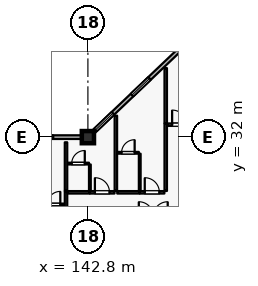
"""IFC4 building model, lengths in metres.
Left out: names, types, materials, properties, quantities, classifications, styles, units other than length and angle.
Written with IfcOpenShell. Run it as: python <this file> out.ifc"""

import sys

from ifc_helpers import new_model, si_unit, direction, frame, frame_2d, origin, origin_2d, place, context, subcontext, project, spatial, rectangle, extrude, element, fill, save


model = new_model("IFC4")
c1 = context("Model", 3, precision=1e-05, world=origin(), true_north=direction((0.0, 1.0)))
c2 = subcontext(c1, "Body", "Model", "MODEL_VIEW")
j1 = project(units=[si_unit("LENGTHUNIT", "METRE"), si_unit("PLANEANGLEUNIT", "RADIAN")], contexts=[c1])
p1 = place(None, origin())
s1 = spatial("IfcSite", under=j1, at=p1, CompositionType="ELEMENT")
p2 = place(p1, origin())
s2 = spatial("IfcBuilding", under=s1, at=p2, CompositionType="ELEMENT")
p3 = place(p2, frame((0.0, 0.0, 16.2)))
s3 = spatial("IfcBuildingStorey", under=s2, at=p3, CompositionType="ELEMENT", Elevation=16.2)
p4 = place(p3, frame((142.8, 32.0, 0.0), z_axis=(0.0, 0.0, 1.0), x_axis=(1.0, 0.0, 0.0)))
e1 = element("IfcColumn", 1, at=p4, inside=s3, PredefinedType="COLUMN", context=c2, shape_type="SweptSolid", body=[
    extrude(rectangle(XDim=0.8, YDim=0.8, at=origin_2d()), origin(), (0.0, 0.0, 1.0), 4.8),
])
p5 = place(p3, frame((134.8, 32.0, 0.0), z_axis=(0.0, 0.0, 1.0), x_axis=(1.0, 0.0, 0.0)))
e2 = element("IfcWall", 2, at=p5, inside=s3, PredefinedType="SOLIDWALL", context=c2, shape_type="SweptSolid", body=[
    extrude(rectangle(XDim=7.6, YDim=0.24, at=frame_2d((3.8, 0.0))), origin(), (0.0, 0.0, 1.0), 4.13),
])
p6 = place(p5, frame((0.84, 0.0, 0.8)))
e3 = element("IfcOpeningElement", 3, at=p6, cuts=e2, PredefinedType="OPENING", context=c2, shape_type="SweptSolid", body=[
    extrude(rectangle(XDim=1.6, YDim=1.6, at=frame_2d((0.8, 0.8))), frame((0.0, 0.13, 0.0), z_axis=(0.0, -1.0, 0.0), x_axis=(1.0, 0.0, 0.0)), (0.0, 0.0, 1.0), 0.26),
])
p7 = place(p5, frame((4.12, 0.0, 0.8)))
e4 = element("IfcOpeningElement", 4, at=p7, cuts=e2, PredefinedType="OPENING", context=c2, shape_type="SweptSolid", body=[
    extrude(rectangle(XDim=1.6, YDim=1.6, at=frame_2d((0.8, 0.8))), frame((0.0, 0.13, 0.0), z_axis=(0.0, -1.0, 0.0), x_axis=(1.0, 0.0, 0.0)), (0.0, 0.0, 1.0), 0.26),
])
p8 = place(p3, frame((143.2, 32.381, 0.0), z_axis=(0.0, 0.0, 1.0), x_axis=(0.724156739794, 0.689635422677, 0.0)))
e5 = element("IfcWall", 5, at=p8, inside=s3, PredefinedType="SOLIDWALL", context=c2, shape_type="SweptSolid", body=[
    extrude(rectangle(XDim=10.495, YDim=0.24, at=frame_2d((5.248, 0.0))), origin(), (0.0, 0.0, 1.0), 4.13),
])
p9 = place(p8, frame((0.125, 0.0, 0.8)))
e6 = element("IfcOpeningElement", 6, at=p9, cuts=e5, PredefinedType="OPENING", context=c2, shape_type="SweptSolid", body=[
    extrude(rectangle(XDim=1.6, YDim=1.6, at=frame_2d((0.8, 0.8))), frame((0.0, 0.13, 0.0), z_axis=(0.0, -1.0, 0.0), x_axis=(1.0, 0.0, 0.0)), (0.0, 0.0, 1.0), 0.26),
])
p10 = place(p8, frame((3.453, 0.0, 0.8)))
e7 = element("IfcOpeningElement", 7, at=p10, cuts=e5, PredefinedType="OPENING", context=c2, shape_type="SweptSolid", body=[
    extrude(rectangle(XDim=1.6, YDim=1.6, at=frame_2d((0.8, 0.8))), frame((0.0, 0.13, 0.0), z_axis=(0.0, -1.0, 0.0), x_axis=(1.0, 0.0, 0.0)), (0.0, 0.0, 1.0), 0.26),
])
p11 = place(p8, frame((7.776, 0.0, 0.8)))
e8 = element("IfcOpeningElement", 8, at=p11, cuts=e5, PredefinedType="OPENING", context=c2, shape_type="SweptSolid", body=[
    extrude(rectangle(XDim=1.6, YDim=1.6, at=frame_2d((0.8, 0.8))), frame((0.0, 0.13, 0.0), z_axis=(0.0, -1.0, 0.0), x_axis=(1.0, 0.0, 0.0)), (0.0, 0.0, 1.0), 0.26),
])
p12 = place(p3, frame((139.85, 27.57, 0.0), z_axis=(0.0, 0.0, 1.0), x_axis=(1.0, 0.0, 0.0)))
e9 = element("IfcWall", 9, at=p12, inside=s3, PredefinedType="PARTITIONING", context=c2, shape_type="SweptSolid", body=[
    extrude(rectangle(XDim=1.41, YDim=0.115, at=frame_2d((0.705, 0.0))), origin(), (0.0, 0.0, 1.0), 4.535),
])
p13 = place(p12, frame((0.275, 0.0, 0.0)))
e10 = element("IfcOpeningElement", 10, at=p13, cuts=e9, PredefinedType="OPENING", context=c2, shape_type="SweptSolid", body=[
    extrude(rectangle(XDim=0.86, YDim=2.12, at=frame_2d((0.43, 1.06))), frame((0.0, 0.067, 0.0), z_axis=(0.0, -1.0, 0.0), x_axis=(1.0, 0.0, 0.0)), (0.0, 0.0, 1.0), 0.135),
])
p14 = place(p3, frame((141.36, 25.06, 0.0), z_axis=(0.0, 0.0, 1.0), x_axis=(0.0, 1.0, 0.0)))
e11 = element("IfcWall", 11, at=p14, inside=s3, PredefinedType="PARTITIONING", context=c2, shape_type="SweptSolid", body=[
    extrude(rectangle(XDim=3.39, YDim=0.16, at=frame_2d((1.695, 0.0))), origin(), (0.0, 0.0, 1.0), 4.535),
])
p15 = place(p3, frame((141.45, 28.37, 0.0), z_axis=(0.0, 0.0, 1.0), x_axis=(1.0, 0.0, 0.0)))
e12 = element("IfcWall", 12, at=p15, inside=s3, PredefinedType="PARTITIONING", context=c2, shape_type="SweptSolid", body=[
    extrude(rectangle(XDim=1.47, YDim=0.16, at=frame_2d((0.735, 0.0))), origin(), (0.0, 0.0, 1.0), 4.535),
])
p16 = place(p3, frame((142.93, 28.37, 0.0), z_axis=(0.0, 0.0, 1.0), x_axis=(1.0, 0.0, 0.0)))
e13 = element("IfcWall", 13, at=p16, inside=s3, PredefinedType="PARTITIONING", context=c2, shape_type="SweptSolid", body=[
    extrude(rectangle(XDim=1.62, YDim=0.16, at=frame_2d((0.81, 0.0))), origin(), (0.0, 0.0, 1.0), 4.535),
])
p17 = place(p16, frame((0.33, 0.0, 0.0)))
e14 = element("IfcOpeningElement", 14, at=p17, cuts=e13, PredefinedType="OPENING", context=c2, shape_type="SweptSolid", body=[
    extrude(rectangle(XDim=0.96, YDim=2.2, at=frame_2d((0.48, 1.1))), frame((0.0, 0.09, 0.0), z_axis=(0.0, -1.0, 0.0), x_axis=(1.0, 0.0, 0.0)), (0.0, 0.0, 1.0), 0.18),
])
p18 = place(p3, frame((142.93, 28.46, 0.0), z_axis=(0.0, 0.0, 1.0), x_axis=(0.0, 1.0, 0.0)))
e15 = element("IfcWall", 15, at=p18, inside=s3, PredefinedType="PARTITIONING", context=c2, shape_type="SweptSolid", body=[
    extrude(rectangle(XDim=1.74, YDim=0.115, at=frame_2d((0.87, 0.0))), origin(), (0.0, 0.0, 1.0), 4.535),
])
p19 = place(p3, frame((141.46, 30.26, 0.0), z_axis=(0.0, 0.0, 1.0), x_axis=(1.0, 0.0, 0.0)))
e16 = element("IfcWall", 16, at=p19, inside=s3, PredefinedType="PARTITIONING", context=c2, shape_type="SweptSolid", body=[
    extrude(rectangle(XDim=1.41, YDim=0.115, at=frame_2d((0.705, 0.0))), origin(), (0.0, 0.0, 1.0), 4.535),
])
p20 = place(p19, frame((0.275, 0.0, 0.0)))
e17 = element("IfcOpeningElement", 17, at=p20, cuts=e16, PredefinedType="OPENING", context=c2, shape_type="SweptSolid", body=[
    extrude(rectangle(XDim=0.86, YDim=2.12, at=frame_2d((0.43, 1.06))), frame((0.0, 0.067, 0.0), z_axis=(0.0, -1.0, 0.0), x_axis=(1.0, 0.0, 0.0)), (0.0, 0.0, 1.0), 0.135),
])
p21 = place(p3, frame((141.36, 28.46, 0.0), z_axis=(0.0, 0.0, 1.0), x_axis=(0.0, 1.0, 0.0)))
e18 = element("IfcWall", 18, at=p21, inside=s3, PredefinedType="PARTITIONING", context=c2, shape_type="SweptSolid", body=[
    extrude(rectangle(XDim=3.2, YDim=0.16, at=frame_2d((1.6, 0.0))), origin(), (0.0, 0.0, 1.0), 4.535),
])
p22 = place(p3, frame((144.73, 28.37, 0.0), z_axis=(0.0, 0.0, 1.0), x_axis=(1.0, 0.0, 0.0)))
e19 = element("IfcWall", 19, at=p22, inside=s3, PredefinedType="PARTITIONING", context=c2, shape_type="SweptSolid", body=[
    extrude(rectangle(XDim=1.47, YDim=0.16, at=frame_2d((0.735, 0.0))), origin(), (0.0, 0.0, 1.0), 4.535),
])
p23 = place(p3, frame((146.21, 28.37, 0.0), z_axis=(0.0, 0.0, 1.0), x_axis=(1.0, 0.0, 0.0)))
e20 = element("IfcWall", 20, at=p23, inside=s3, PredefinedType="PARTITIONING", context=c2, shape_type="SweptSolid", body=[
    extrude(rectangle(XDim=1.62, YDim=0.16, at=frame_2d((0.81, 0.0))), origin(), (0.0, 0.0, 1.0), 4.535),
])
p24 = place(p23, frame((0.33, 0.0, 0.0)))
e21 = element("IfcOpeningElement", 21, at=p24, cuts=e20, PredefinedType="OPENING", context=c2, shape_type="SweptSolid", body=[
    extrude(rectangle(XDim=0.96, YDim=2.2, at=frame_2d((0.48, 1.1))), frame((0.0, 0.09, 0.0), z_axis=(0.0, -1.0, 0.0), x_axis=(1.0, 0.0, 0.0)), (0.0, 0.0, 1.0), 0.18),
])
p25 = place(p3, frame((146.21, 28.46, 0.0), z_axis=(0.0, 0.0, 1.0), x_axis=(0.0, 1.0, 0.0)))
e22 = element("IfcWall", 22, at=p25, inside=s3, PredefinedType="PARTITIONING", context=c2, shape_type="SweptSolid", body=[
    extrude(rectangle(XDim=2.45, YDim=0.115, at=frame_2d((1.225, 0.0))), origin(), (0.0, 0.0, 1.0), 4.535),
])
p26 = place(p3, frame((144.74, 30.97, 0.0), z_axis=(0.0, 0.0, 1.0), x_axis=(1.0, 0.0, 0.0)))
e23 = element("IfcWall", 23, at=p26, inside=s3, PredefinedType="PARTITIONING", context=c2, shape_type="SweptSolid", body=[
    extrude(rectangle(XDim=1.41, YDim=0.115, at=frame_2d((0.705, 0.0))), origin(), (0.0, 0.0, 1.0), 4.535),
])
p27 = place(p26, frame((0.275, 0.0, 0.0)))
e24 = element("IfcOpeningElement", 24, at=p27, cuts=e23, PredefinedType="OPENING", context=c2, shape_type="SweptSolid", body=[
    extrude(rectangle(XDim=0.86, YDim=2.12, at=frame_2d((0.43, 1.06))), frame((0.0, 0.067, 0.0), z_axis=(0.0, -1.0, 0.0), x_axis=(1.0, 0.0, 0.0)), (0.0, 0.0, 1.0), 0.135),
])
p28 = place(p3, frame((144.64, 28.46, 0.0), z_axis=(0.0, 0.0, 1.0), x_axis=(0.0, 1.0, 0.0)))
e25 = element("IfcWall", 25, at=p28, inside=s3, PredefinedType="PARTITIONING", context=c2, shape_type="SweptSolid", body=[
    extrude(rectangle(XDim=4.95, YDim=0.16, at=frame_2d((2.475, 0.0))), origin(), (0.0, 0.0, 1.0), 4.535),
])
p29 = place(p3, frame((147.92, 28.46, 0.0), z_axis=(0.0, 0.0, 1.0), x_axis=(0.0, 1.0, 0.0)))
e26 = element("IfcWall", 26, at=p29, inside=s3, PredefinedType="PARTITIONING", context=c2, shape_type="SweptSolid", body=[
    extrude(rectangle(XDim=4.44, YDim=0.16, at=frame_2d((2.22, 0.0))), origin(), (0.0, 0.0, 1.0), 4.535),
])
p30 = place(p3, frame((148.01, 32.82, 0.0), z_axis=(0.0, 0.0, 1.0), x_axis=(1.0, 0.0, 0.0)))
e27 = element("IfcWall", 27, at=p30, inside=s3, PredefinedType="PARTITIONING", context=c2, shape_type="SweptSolid", body=[
    extrude(rectangle(XDim=1.62, YDim=0.16, at=frame_2d((0.81, 0.0))), origin(), (0.0, 0.0, 1.0), 4.535),
])
p31 = place(p30, frame((0.33, 0.0, 0.0)))
e28 = element("IfcOpeningElement", 28, at=p31, cuts=e27, PredefinedType="OPENING", context=c2, shape_type="SweptSolid", body=[
    extrude(rectangle(XDim=0.96, YDim=2.2, at=frame_2d((0.48, 1.1))), frame((0.0, 0.09, 0.0), z_axis=(0.0, -1.0, 0.0), x_axis=(1.0, 0.0, 0.0)), (0.0, 0.0, 1.0), 0.18),
])
p32 = place(p3, frame((147.92, 32.91, 0.0), z_axis=(0.0, 0.0, 1.0), x_axis=(0.0, 1.0, 0.0)))
e29 = element("IfcWall", 29, at=p32, inside=s3, PredefinedType="PARTITIONING", context=c2, shape_type="SweptSolid", body=[
    extrude(rectangle(XDim=3.63, YDim=0.16, at=frame_2d((1.815, 0.0))), origin(), (0.0, 0.0, 1.0), 4.535),
])
p33 = place(p7, origin())
e30 = element("IfcWindow", 30, at=p33, inside=s3, PartitioningType="SINGLE_PANEL", PredefinedType="WINDOW", context=c2, shape_type="SweptSolid", body=[
    extrude(rectangle(XDim=1.6, YDim=1.6, at=frame_2d((0.8, 0.8))), frame((0.0, 0.03, 0.0), z_axis=(0.0, -1.0, 0.0), x_axis=(1.0, 0.0, 0.0)), (0.0, 0.0, 1.0), 0.06),
])
fill(e4, e30)
p34 = place(p9, origin())
e31 = element("IfcWindow", 31, at=p34, inside=s3, PartitioningType="SINGLE_PANEL", PredefinedType="WINDOW", context=c2, shape_type="SweptSolid", body=[
    extrude(rectangle(XDim=1.6, YDim=1.6, at=frame_2d((0.8, 0.8))), frame((0.0, 0.03, 0.0), z_axis=(0.0, -1.0, 0.0), x_axis=(1.0, 0.0, 0.0)), (0.0, 0.0, 1.0), 0.06),
])
fill(e6, e31)
p35 = place(p10, origin())
e32 = element("IfcWindow", 32, at=p35, inside=s3, PartitioningType="SINGLE_PANEL", PredefinedType="WINDOW", context=c2, shape_type="SweptSolid", body=[
    extrude(rectangle(XDim=1.6, YDim=1.6, at=frame_2d((0.8, 0.8))), frame((0.0, 0.03, 0.0), z_axis=(0.0, -1.0, 0.0), x_axis=(1.0, 0.0, 0.0)), (0.0, 0.0, 1.0), 0.06),
])
fill(e7, e32)
p36 = place(p13, origin())
e33 = element("IfcDoor", 33, at=p36, inside=s3, OperationType="SINGLE_SWING_RIGHT", PredefinedType="DOOR", context=c2, shape_type="SweptSolid", body=[
    extrude(rectangle(XDim=0.86, YDim=2.12, at=frame_2d((0.43, 1.06))), frame((0.0, 0.025, 0.0), z_axis=(0.0, -1.0, 0.0), x_axis=(1.0, 0.0, 0.0)), (0.0, 0.0, 1.0), 0.05),
])
fill(e10, e33)
p37 = place(p17, origin())
e34 = element("IfcDoor", 34, at=p37, inside=s3, OperationType="SINGLE_SWING_LEFT", PredefinedType="DOOR", context=c2, shape_type="SweptSolid", body=[
    extrude(rectangle(XDim=0.96, YDim=2.2, at=frame_2d((0.48, 1.1))), frame((0.0, 0.025, 0.0), z_axis=(0.0, -1.0, 0.0), x_axis=(1.0, 0.0, 0.0)), (0.0, 0.0, 1.0), 0.05),
])
fill(e14, e34)
p38 = place(p20, origin())
e35 = element("IfcDoor", 35, at=p38, inside=s3, OperationType="SINGLE_SWING_RIGHT", PredefinedType="DOOR", context=c2, shape_type="SweptSolid", body=[
    extrude(rectangle(XDim=0.86, YDim=2.12, at=frame_2d((0.43, 1.06))), frame((0.0, 0.025, 0.0), z_axis=(0.0, -1.0, 0.0), x_axis=(1.0, 0.0, 0.0)), (0.0, 0.0, 1.0), 0.05),
])
fill(e17, e35)
p39 = place(p24, origin())
e36 = element("IfcDoor", 36, at=p39, inside=s3, OperationType="SINGLE_SWING_LEFT", PredefinedType="DOOR", context=c2, shape_type="SweptSolid", body=[
    extrude(rectangle(XDim=0.96, YDim=2.2, at=frame_2d((0.48, 1.1))), frame((0.0, 0.025, 0.0), z_axis=(0.0, -1.0, 0.0), x_axis=(1.0, 0.0, 0.0)), (0.0, 0.0, 1.0), 0.05),
])
fill(e21, e36)
p40 = place(p27, origin())
e37 = element("IfcDoor", 37, at=p40, inside=s3, OperationType="SINGLE_SWING_RIGHT", PredefinedType="DOOR", context=c2, shape_type="SweptSolid", body=[
    extrude(rectangle(XDim=0.86, YDim=2.12, at=frame_2d((0.43, 1.06))), frame((0.0, 0.025, 0.0), z_axis=(0.0, -1.0, 0.0), x_axis=(1.0, 0.0, 0.0)), (0.0, 0.0, 1.0), 0.05),
])
fill(e24, e37)
p41 = place(p31, origin())
e38 = element("IfcDoor", 38, at=p41, inside=s3, OperationType="SINGLE_SWING_LEFT", PredefinedType="DOOR", context=c2, shape_type="SweptSolid", body=[
    extrude(rectangle(XDim=0.96, YDim=2.2, at=frame_2d((0.48, 1.1))), frame((0.0, 0.025, 0.0), z_axis=(0.0, -1.0, 0.0), x_axis=(1.0, 0.0, 0.0)), (0.0, 0.0, 1.0), 0.05),
])
fill(e28, e38)
save(model, sys.argv[1])
